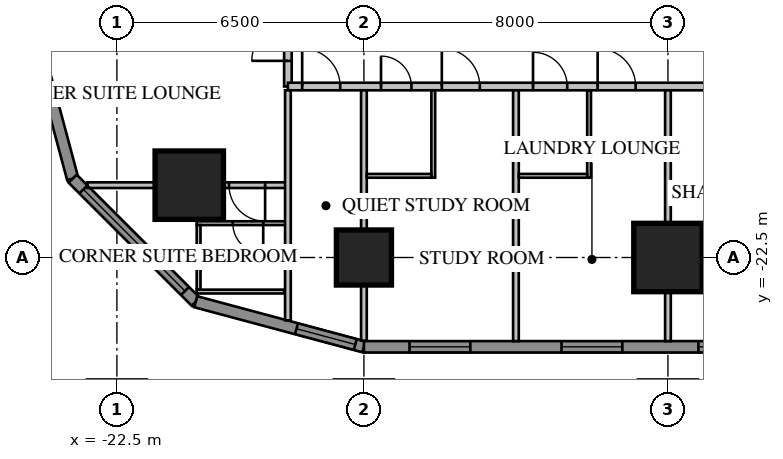
"""IFC4 building model, lengths in metres.
Left out: names, types, materials, properties, quantities, classifications, styles, units other than length and angle.
Written with IfcOpenShell. Run it as: python <this file> out.ifc"""

import sys

from ifc_helpers import new_model, si_unit, direction, frame, frame_2d, origin, origin_2d, place, context, subcontext, project, spatial, rectangle, extrude, element, fill, save


model = new_model("IFC4")
c1 = context("Model", 3, precision=1e-05, world=origin(), true_north=direction((0.0, 1.0)))
c2 = subcontext(c1, "Body", "Model", "MODEL_VIEW")
j1 = project(units=[si_unit("LENGTHUNIT", "METRE"), si_unit("PLANEANGLEUNIT", "RADIAN")], contexts=[c1])
p1 = place(None, origin())
s1 = spatial("IfcSite", under=j1, at=p1, CompositionType="ELEMENT")
p2 = place(p1, origin())
s2 = spatial("IfcBuilding", under=s1, at=p2, CompositionType="ELEMENT")
p3 = place(p2, frame((0.0, 0.0, 39.1)))
s3 = spatial("IfcBuildingStorey", under=s2, at=p3, CompositionType="ELEMENT", Elevation=39.1)
p4 = place(p3, frame((-20.596, -20.596, 0.0), z_axis=(0.0, 0.0, 1.0), x_axis=(1.0, 0.0, 0.0)))
e1 = element("IfcColumn", 1, at=p4, inside=s3, PredefinedType="COLUMN", context=c2, shape_type="SweptSolid", body=[
    extrude(rectangle(XDim=1.8, YDim=1.8, at=origin_2d()), origin(), (0.0, 0.0, 1.0), 3.85),
])
p5 = place(p3, frame((-16.0, -22.5, 0.0), z_axis=(0.0, 0.0, 1.0), x_axis=(1.0, 0.0, 0.0)))
e2 = element("IfcColumn", 2, at=p5, inside=s3, PredefinedType="COLUMN", context=c2, shape_type="SweptSolid", body=[
    extrude(rectangle(XDim=1.45, YDim=1.45, at=origin_2d()), origin(), (0.0, 0.0, 1.0), 3.85),
])
p6 = place(p3, frame((-8.0, -22.5, 0.0), z_axis=(0.0, 0.0, 1.0), x_axis=(1.0, 0.0, 0.0)))
e3 = element("IfcColumn", 3, at=p6, inside=s3, PredefinedType="COLUMN", context=c2, shape_type="SweptSolid", body=[
    extrude(rectangle(XDim=1.8, YDim=1.8, at=origin_2d()), origin(), (0.0, 0.0, 1.0), 3.85),
])
p7 = place(p3, frame((-24.85, -16.0, 0.0), z_axis=(0.0, 0.0, 1.0), x_axis=(0.258839972501, -0.965920218567, 0.0)))
e4 = element("IfcWall", 4, at=p7, inside=s3, PredefinedType="SOLIDWALL", context=c2, shape_type="SweptSolid", body=[
    extrude(rectangle(XDim=4.581, YDim=0.3, at=frame_2d((2.291, 0.0))), origin(), (0.0, 0.0, 1.0), 3.65),
])
p8 = place(p3, frame((-23.664, -20.425, 0.0), z_axis=(0.0, 0.0, 1.0), x_axis=(0.707106781187, -0.707106781187, 0.0)))
e5 = element("IfcWall", 5, at=p8, inside=s3, PredefinedType="SOLIDWALL", context=c2, shape_type="SweptSolid", body=[
    extrude(rectangle(XDim=4.581, YDim=0.3, at=frame_2d((2.291, 0.0))), origin(), (0.0, 0.0, 1.0), 3.65),
])
p9 = place(p8, frame((0.4, 0.0, 0.75)))
e6 = element("IfcOpeningElement", 6, at=p9, cuts=e5, PredefinedType="OPENING", context=c2, shape_type="SweptSolid", body=[
    extrude(rectangle(XDim=3.781, YDim=1.8, at=frame_2d((1.891, 0.9))), frame((0.0, 0.17, 0.0), z_axis=(0.0, -1.0, 0.0), x_axis=(1.0, 0.0, 0.0)), (0.0, 0.0, 1.0), 0.34),
])
p10 = place(p3, frame((-20.425, -23.664, 0.0), z_axis=(0.0, 0.0, 1.0), x_axis=(0.965920218567, -0.258839972501, 0.0)))
e7 = element("IfcWall", 7, at=p10, inside=s3, PredefinedType="SOLIDWALL", context=c2, shape_type="SweptSolid", body=[
    extrude(rectangle(XDim=4.581, YDim=0.3, at=frame_2d((2.291, 0.0))), origin(), (0.0, 0.0, 1.0), 3.65),
])
p11 = place(p10, frame((2.746, 0.0, 0.75)))
e8 = element("IfcOpeningElement", 8, at=p11, cuts=e7, PredefinedType="OPENING", context=c2, shape_type="SweptSolid", body=[
    extrude(rectangle(XDim=1.6, YDim=1.8, at=frame_2d((0.8, 0.9))), frame((0.0, 0.17, 0.0), z_axis=(0.0, -1.0, 0.0), x_axis=(1.0, 0.0, 0.0)), (0.0, 0.0, 1.0), 0.34),
])
p12 = place(p3, frame((-16.0, -24.85, 0.0), z_axis=(0.0, 0.0, 1.0), x_axis=(1.0, 0.0, 0.0)))
e9 = element("IfcWall", 9, at=p12, inside=s3, PredefinedType="SOLIDWALL", context=c2, shape_type="SweptSolid", body=[
    extrude(rectangle(XDim=32.0, YDim=0.3, at=frame_2d((16.0, 0.0))), origin(), (0.0, 0.0, 1.0), 3.65),
])
p13 = place(p12, frame((1.2, 0.0, 0.75)))
e10 = element("IfcOpeningElement", 10, at=p13, cuts=e9, PredefinedType="OPENING", context=c2, shape_type="SweptSolid", body=[
    extrude(rectangle(XDim=1.6, YDim=1.8, at=frame_2d((0.8, 0.9))), frame((0.0, 0.17, 0.0), z_axis=(0.0, -1.0, 0.0), x_axis=(1.0, 0.0, 0.0)), (0.0, 0.0, 1.0), 0.34),
])
p14 = place(p12, frame((5.2, 0.0, 0.75)))
e11 = element("IfcOpeningElement", 11, at=p14, cuts=e9, PredefinedType="OPENING", context=c2, shape_type="SweptSolid", body=[
    extrude(rectangle(XDim=1.6, YDim=1.8, at=frame_2d((0.8, 0.9))), frame((0.0, 0.17, 0.0), z_axis=(0.0, -1.0, 0.0), x_axis=(1.0, 0.0, 0.0)), (0.0, 0.0, 1.0), 0.34),
])
p15 = place(p12, frame((17.2, 0.0, 0.75)))
e12 = element("IfcOpeningElement", 12, at=p15, cuts=e9, PredefinedType="OPENING", context=c2, shape_type="SweptSolid", body=[
    extrude(rectangle(XDim=1.6, YDim=1.8, at=frame_2d((0.8, 0.9))), frame((0.0, 0.17, 0.0), z_axis=(0.0, -1.0, 0.0), x_axis=(1.0, 0.0, 0.0)), (0.0, 0.0, 1.0), 0.34),
])
p16 = place(p12, frame((21.2, 0.0, 0.75)))
e13 = element("IfcOpeningElement", 13, at=p16, cuts=e9, PredefinedType="OPENING", context=c2, shape_type="SweptSolid", body=[
    extrude(rectangle(XDim=1.6, YDim=1.8, at=frame_2d((0.8, 0.9))), frame((0.0, 0.17, 0.0), z_axis=(0.0, -1.0, 0.0), x_axis=(1.0, 0.0, 0.0)), (0.0, 0.0, 1.0), 0.34),
])
p17 = place(p12, frame((25.2, 0.0, 0.75)))
e14 = element("IfcOpeningElement", 14, at=p17, cuts=e9, PredefinedType="OPENING", context=c2, shape_type="SweptSolid", body=[
    extrude(rectangle(XDim=1.6, YDim=1.8, at=frame_2d((0.8, 0.9))), frame((0.0, 0.17, 0.0), z_axis=(0.0, -1.0, 0.0), x_axis=(1.0, 0.0, 0.0)), (0.0, 0.0, 1.0), 0.34),
])
p18 = place(p12, frame((29.2, 0.0, 0.75)))
e15 = element("IfcOpeningElement", 15, at=p18, cuts=e9, PredefinedType="OPENING", context=c2, shape_type="SweptSolid", body=[
    extrude(rectangle(XDim=1.6, YDim=1.8, at=frame_2d((0.8, 0.9))), frame((0.0, 0.17, 0.0), z_axis=(0.0, -1.0, 0.0), x_axis=(1.0, 0.0, 0.0)), (0.0, 0.0, 1.0), 0.34),
])
p19 = place(p12, frame((8.8, 0.0, 0.75)))
e16 = element("IfcOpeningElement", 16, at=p19, cuts=e9, PredefinedType="OPENING", context=c2, shape_type="SweptSolid", body=[
    extrude(rectangle(XDim=2.4, YDim=1.8, at=frame_2d((1.2, 0.9))), frame((0.0, 0.17, 0.0), z_axis=(0.0, -1.0, 0.0), x_axis=(1.0, 0.0, 0.0)), (0.0, 0.0, 1.0), 0.34),
])
p20 = place(p12, frame((13.812, 0.0, 0.0)))
e17 = element("IfcOpeningElement", 17, at=p20, cuts=e9, PredefinedType="OPENING", context=c2, shape_type="SweptSolid", body=[
    extrude(rectangle(XDim=1.0, YDim=2.4, at=frame_2d((0.5, 1.2))), frame((0.0, 0.17, 0.0), z_axis=(0.0, -1.0, 0.0), x_axis=(1.0, 0.0, 0.0)), (0.0, 0.0, 1.0), 0.34),
])
p21 = place(p3, frame((-18.0, 18.0, 0.0), z_axis=(0.0, 0.0, 1.0), x_axis=(0.0, -1.0, 0.0)))
e18 = element("IfcWall", 18, at=p21, inside=s3, PredefinedType="PARTITIONING", context=c2, shape_type="SweptSolid", body=[
    extrude(rectangle(XDim=36.0, YDim=0.2, at=frame_2d((18.0, 0.0))), origin(), (0.0, 0.0, 1.0), 3.65),
])
p22 = place(p21, frame((10.4, 0.0, 0.0)))
e19 = element("IfcOpeningElement", 19, at=p22, cuts=e18, PredefinedType="OPENING", context=c2, shape_type="SweptSolid", body=[
    extrude(rectangle(XDim=1.0, YDim=2.1, at=frame_2d((0.5, 1.05))), frame((0.0, 0.12, 0.0), z_axis=(0.0, -1.0, 0.0), x_axis=(1.0, 0.0, 0.0)), (0.0, 0.0, 1.0), 0.24),
])
p23 = place(p21, frame((0.375, 0.0, 0.0)))
e20 = element("IfcOpeningElement", 20, at=p23, cuts=e18, PredefinedType="OPENING", context=c2, shape_type="SweptSolid", body=[
    extrude(rectangle(XDim=1.0, YDim=2.1, at=frame_2d((0.5, 1.05))), frame((0.0, 0.12, 0.0), z_axis=(0.0, -1.0, 0.0), x_axis=(1.0, 0.0, 0.0)), (0.0, 0.0, 1.0), 0.24),
])
p24 = place(p21, frame((34.375, 0.0, 0.0)))
e21 = element("IfcOpeningElement", 21, at=p24, cuts=e18, PredefinedType="OPENING", context=c2, shape_type="SweptSolid", body=[
    extrude(rectangle(XDim=0.95, YDim=2.1, at=frame_2d((0.475, 1.05))), frame((0.0, 0.12, 0.0), z_axis=(0.0, -1.0, 0.0), x_axis=(1.0, 0.0, 0.0)), (0.0, 0.0, 1.0), 0.24),
])
p25 = place(p3, frame((-18.065, -21.596, 0.0), z_axis=(0.0, 0.0, 1.0), x_axis=(-1.0, 0.0, 0.0)))
e22 = element("IfcWall", 22, at=p25, inside=s3, PredefinedType="PARTITIONING", context=c2, shape_type="SweptSolid", body=[
    extrude(rectangle(XDim=2.335, YDim=0.1, at=frame_2d((1.167, 0.0))), origin(), (0.0, 0.0, 1.0), 3.65),
])
p26 = place(p25, frame((0.585, 0.0, 0.0)))
e23 = element("IfcOpeningElement", 23, at=p26, cuts=e22, PredefinedType="OPENING", context=c2, shape_type="SweptSolid", body=[
    extrude(rectangle(XDim=0.8, YDim=2.1, at=frame_2d((0.4, 1.05))), frame((0.0, 0.07, 0.0), z_axis=(0.0, -1.0, 0.0), x_axis=(1.0, 0.0, 0.0)), (0.0, 0.0, 1.0), 0.14),
])
p27 = place(p3, frame((-20.35, -21.646, 0.0), z_axis=(0.0, 0.0, 1.0), x_axis=(0.0, -1.0, 0.0)))
e24 = element("IfcWall", 24, at=p27, inside=s3, PredefinedType="PARTITIONING", context=c2, shape_type="SweptSolid", body=[
    extrude(rectangle(XDim=1.7, YDim=0.1, at=frame_2d((0.85, 0.0))), origin(), (0.0, 0.0, 1.0), 3.65),
])
p28 = place(p3, frame((-18.1, -23.396, 0.0), z_axis=(0.0, 0.0, 1.0), x_axis=(-1.0, 0.0, 0.0)))
e25 = element("IfcWall", 25, at=p28, inside=s3, PredefinedType="PARTITIONING", context=c2, shape_type="SweptSolid", body=[
    extrude(rectangle(XDim=2.3, YDim=0.1, at=frame_2d((1.15, 0.0))), origin(), (0.0, 0.0, 1.0), 3.65),
])
p29 = place(p3, frame((-18.065, -20.596, 0.0), z_axis=(0.0, 0.0, 1.0), x_axis=(-1.0, 0.0, 0.0)))
e26 = element("IfcWall", 26, at=p29, inside=s3, PredefinedType="PARTITIONING", context=c2, shape_type="SweptSolid", body=[
    extrude(rectangle(XDim=5.209, YDim=0.15, at=frame_2d((2.604, 0.0))), origin(), (0.0, 0.0, 1.0), 3.65),
])
p30 = place(p29, frame((0.535, 0.0, 0.0)))
e27 = element("IfcOpeningElement", 27, at=p30, cuts=e26, PredefinedType="OPENING", context=c2, shape_type="SweptSolid", body=[
    extrude(rectangle(XDim=0.95, YDim=2.1, at=frame_2d((0.475, 1.05))), frame((0.0, 0.095, 0.0), z_axis=(0.0, -1.0, 0.0), x_axis=(1.0, 0.0, 0.0)), (0.0, 0.0, 1.0), 0.19),
])
p31 = place(p3, frame((-18.0, -18.0, 0.0), z_axis=(0.0, 0.0, 1.0), x_axis=(1.0, 0.0, 0.0)))
e28 = element("IfcWall", 28, at=p31, inside=s3, PredefinedType="PARTITIONING", context=c2, shape_type="SweptSolid", body=[
    extrude(rectangle(XDim=36.0, YDim=0.2, at=frame_2d((18.0, 0.0))), origin(), (0.0, 0.0, 1.0), 3.65),
])
p32 = place(p31, frame((0.375, 0.0, 0.0)))
e29 = element("IfcOpeningElement", 29, at=p32, cuts=e28, PredefinedType="OPENING", context=c2, shape_type="SweptSolid", body=[
    extrude(rectangle(XDim=1.0, YDim=2.1, at=frame_2d((0.5, 1.05))), frame((0.0, 0.12, 0.0), z_axis=(0.0, -1.0, 0.0), x_axis=(1.0, 0.0, 0.0)), (0.0, 0.0, 1.0), 0.24),
])
p33 = place(p31, frame((2.45, 0.0, 0.0)))
e30 = element("IfcOpeningElement", 30, at=p33, cuts=e28, PredefinedType="OPENING", context=c2, shape_type="SweptSolid", body=[
    extrude(rectangle(XDim=0.8, YDim=2.1, at=frame_2d((0.4, 1.05))), frame((0.0, 0.12, 0.0), z_axis=(0.0, -1.0, 0.0), x_axis=(1.0, 0.0, 0.0)), (0.0, 0.0, 1.0), 0.24),
])
p34 = place(p31, frame((4.05, 0.0, 0.0)))
e31 = element("IfcOpeningElement", 31, at=p34, cuts=e28, PredefinedType="OPENING", context=c2, shape_type="SweptSolid", body=[
    extrude(rectangle(XDim=1.0, YDim=2.1, at=frame_2d((0.5, 1.05))), frame((0.0, 0.12, 0.0), z_axis=(0.0, -1.0, 0.0), x_axis=(1.0, 0.0, 0.0)), (0.0, 0.0, 1.0), 0.24),
])
p35 = place(p31, frame((6.45, 0.0, 0.0)))
e32 = element("IfcOpeningElement", 32, at=p35, cuts=e28, PredefinedType="OPENING", context=c2, shape_type="SweptSolid", body=[
    extrude(rectangle(XDim=0.9, YDim=2.1, at=frame_2d((0.45, 1.05))), frame((0.0, 0.12, 0.0), z_axis=(0.0, -1.0, 0.0), x_axis=(1.0, 0.0, 0.0)), (0.0, 0.0, 1.0), 0.24),
])
p36 = place(p31, frame((8.15, 0.0, 0.0)))
e33 = element("IfcOpeningElement", 33, at=p36, cuts=e28, PredefinedType="OPENING", context=c2, shape_type="SweptSolid", body=[
    extrude(rectangle(XDim=1.0, YDim=2.1, at=frame_2d((0.5, 1.05))), frame((0.0, 0.12, 0.0), z_axis=(0.0, -1.0, 0.0), x_axis=(1.0, 0.0, 0.0)), (0.0, 0.0, 1.0), 0.24),
])
p37 = place(p31, frame((18.375, 0.0, 0.0)))
e34 = element("IfcOpeningElement", 34, at=p37, cuts=e28, PredefinedType="OPENING", context=c2, shape_type="SweptSolid", body=[
    extrude(rectangle(XDim=0.95, YDim=2.1, at=frame_2d((0.475, 1.05))), frame((0.0, 0.12, 0.0), z_axis=(0.0, -1.0, 0.0), x_axis=(1.0, 0.0, 0.0)), (0.0, 0.0, 1.0), 0.24),
])
p38 = place(p31, frame((24.25, 0.0, 0.0)))
e35 = element("IfcOpeningElement", 35, at=p38, cuts=e28, PredefinedType="OPENING", context=c2, shape_type="SweptSolid", body=[
    extrude(rectangle(XDim=0.95, YDim=2.1, at=frame_2d((0.475, 1.05))), frame((0.0, 0.12, 0.0), z_axis=(0.0, -1.0, 0.0), x_axis=(1.0, 0.0, 0.0)), (0.0, 0.0, 1.0), 0.24),
])
p39 = place(p31, frame((26.375, 0.0, 0.0)))
e36 = element("IfcOpeningElement", 36, at=p39, cuts=e28, PredefinedType="OPENING", context=c2, shape_type="SweptSolid", body=[
    extrude(rectangle(XDim=0.95, YDim=2.1, at=frame_2d((0.475, 1.05))), frame((0.0, 0.12, 0.0), z_axis=(0.0, -1.0, 0.0), x_axis=(1.0, 0.0, 0.0)), (0.0, 0.0, 1.0), 0.24),
])
p40 = place(p31, frame((32.25, 0.0, 0.0)))
e37 = element("IfcOpeningElement", 37, at=p40, cuts=e28, PredefinedType="OPENING", context=c2, shape_type="SweptSolid", body=[
    extrude(rectangle(XDim=0.95, YDim=2.1, at=frame_2d((0.475, 1.05))), frame((0.0, 0.12, 0.0), z_axis=(0.0, -1.0, 0.0), x_axis=(1.0, 0.0, 0.0)), (0.0, 0.0, 1.0), 0.24),
])
p41 = place(p31, frame((34.375, 0.0, 0.0)))
e38 = element("IfcOpeningElement", 38, at=p41, cuts=e28, PredefinedType="OPENING", context=c2, shape_type="SweptSolid", body=[
    extrude(rectangle(XDim=0.95, YDim=2.1, at=frame_2d((0.475, 1.05))), frame((0.0, 0.12, 0.0), z_axis=(0.0, -1.0, 0.0), x_axis=(1.0, 0.0, 0.0)), (0.0, 0.0, 1.0), 0.24),
])
p42 = place(p31, frame((11.2, 0.0, 0.0)))
e39 = element("IfcOpeningElement", 39, at=p42, cuts=e28, PredefinedType="OPENING", context=c2, shape_type="SweptSolid", body=[
    extrude(rectangle(XDim=1.0, YDim=2.1, at=frame_2d((0.5, 1.05))), frame((0.0, 0.12, 0.0), z_axis=(0.0, -1.0, 0.0), x_axis=(1.0, 0.0, 0.0)), (0.0, 0.0, 1.0), 0.24),
])
p43 = place(p3, frame((-18.0, -18.1, 0.0), z_axis=(0.0, 0.0, 1.0), x_axis=(0.0, -1.0, 0.0)))
e40 = element("IfcWall", 40, at=p43, inside=s3, PredefinedType="PARTITIONING", context=c2, shape_type="SweptSolid", body=[
    extrude(rectangle(XDim=6.053, YDim=0.15, at=frame_2d((3.027, 0.0))), origin(), (0.0, 0.0, 1.0), 3.65),
])
p44 = place(p3, frame((-16.0, -18.1, 0.0), z_axis=(0.0, 0.0, 1.0), x_axis=(0.0, -1.0, 0.0)))
e41 = element("IfcWall", 41, at=p44, inside=s3, PredefinedType="PARTITIONING", context=c2, shape_type="SweptSolid", body=[
    extrude(rectangle(XDim=6.589, YDim=0.15, at=frame_2d((3.295, 0.0))), origin(), (0.0, 0.0, 1.0), 3.65),
])
for number, where, z_axis, x_axis in (
    (42, (-12.0, -18.1, 0.0), (0.0, 0.0, 1.0), (0.0, -1.0, 0.0)),
    (43, (-8.0, -18.1, 0.0), (0.0, 0.0, 1.0), (0.0, -1.0, 0.0)),
):
    element("IfcWall", number, at=place(p3, frame(where, z_axis=z_axis, x_axis=x_axis)), inside=s3, PredefinedType="PARTITIONING", context=c2, shape_type="SweptSolid", body=[
        extrude(rectangle(XDim=6.6, YDim=0.15, at=frame_2d((3.3, 0.0))), origin(), (0.0, 0.0, 1.0), 3.65),
    ])
p45 = place(p3, frame((-14.175, -18.1, 0.0), z_axis=(0.0, 0.0, 1.0), x_axis=(0.0, -1.0, 0.0)))
e44 = element("IfcWall", 44, at=p45, inside=s3, PredefinedType="PARTITIONING", context=c2, shape_type="SweptSolid", body=[
    extrude(rectangle(XDim=2.3, YDim=0.1, at=frame_2d((1.15, 0.0))), origin(), (0.0, 0.0, 1.0), 3.65),
])
p46 = place(p3, frame((-15.925, -20.35, 0.0), z_axis=(0.0, 0.0, 1.0), x_axis=(1.0, 0.0, 0.0)))
e45 = element("IfcWall", 45, at=p46, inside=s3, PredefinedType="PARTITIONING", context=c2, shape_type="SweptSolid", body=[
    extrude(rectangle(XDim=1.7, YDim=0.1, at=frame_2d((0.85, 0.0))), origin(), (0.0, 0.0, 1.0), 3.65),
])
p47 = place(p3, frame((-10.075, -18.1, 0.0), z_axis=(0.0, 0.0, 1.0), x_axis=(0.0, -1.0, 0.0)))
e46 = element("IfcWall", 46, at=p47, inside=s3, PredefinedType="PARTITIONING", context=c2, shape_type="SweptSolid", body=[
    extrude(rectangle(XDim=2.3, YDim=0.1, at=frame_2d((1.15, 0.0))), origin(), (0.0, 0.0, 1.0), 3.65),
])
p48 = place(p3, frame((-11.925, -20.35, 0.0), z_axis=(0.0, 0.0, 1.0), x_axis=(1.0, 0.0, 0.0)))
e47 = element("IfcWall", 47, at=p48, inside=s3, PredefinedType="PARTITIONING", context=c2, shape_type="SweptSolid", body=[
    extrude(rectangle(XDim=1.8, YDim=0.1, at=frame_2d((0.9, 0.0))), origin(), (0.0, 0.0, 1.0), 3.65),
])
p49 = place(p9, origin())
e48 = element("IfcWindow", 48, at=p49, inside=s3, PartitioningType="SINGLE_PANEL", PredefinedType="WINDOW", context=c2, shape_type="SweptSolid", body=[
    extrude(rectangle(XDim=3.781, YDim=1.8, at=frame_2d((1.891, 0.9))), frame((0.0, 0.03, 0.0), z_axis=(0.0, -1.0, 0.0), x_axis=(1.0, 0.0, 0.0)), (0.0, 0.0, 1.0), 0.06),
])
fill(e6, e48)
p50 = place(p11, origin())
e49 = element("IfcWindow", 49, at=p50, inside=s3, PartitioningType="SINGLE_PANEL", PredefinedType="WINDOW", context=c2, shape_type="SweptSolid", body=[
    extrude(rectangle(XDim=1.6, YDim=1.8, at=frame_2d((0.8, 0.9))), frame((0.0, 0.03, 0.0), z_axis=(0.0, -1.0, 0.0), x_axis=(1.0, 0.0, 0.0)), (0.0, 0.0, 1.0), 0.06),
])
fill(e8, e49)
p51 = place(p13, origin())
e50 = element("IfcWindow", 50, at=p51, inside=s3, PartitioningType="SINGLE_PANEL", PredefinedType="WINDOW", context=c2, shape_type="SweptSolid", body=[
    extrude(rectangle(XDim=1.6, YDim=1.8, at=frame_2d((0.8, 0.9))), frame((0.0, 0.03, 0.0), z_axis=(0.0, -1.0, 0.0), x_axis=(1.0, 0.0, 0.0)), (0.0, 0.0, 1.0), 0.06),
])
fill(e10, e50)
p52 = place(p14, origin())
e51 = element("IfcWindow", 51, at=p52, inside=s3, PartitioningType="SINGLE_PANEL", PredefinedType="WINDOW", context=c2, shape_type="SweptSolid", body=[
    extrude(rectangle(XDim=1.6, YDim=1.8, at=frame_2d((0.8, 0.9))), frame((0.0, 0.03, 0.0), z_axis=(0.0, -1.0, 0.0), x_axis=(1.0, 0.0, 0.0)), (0.0, 0.0, 1.0), 0.06),
])
fill(e11, e51)
p53 = place(p19, origin())
e52 = element("IfcWindow", 52, at=p53, inside=s3, PartitioningType="SINGLE_PANEL", PredefinedType="WINDOW", context=c2, shape_type="SweptSolid", body=[
    extrude(rectangle(XDim=2.4, YDim=1.8, at=frame_2d((1.2, 0.9))), frame((0.0, 0.03, 0.0), z_axis=(0.0, -1.0, 0.0), x_axis=(1.0, 0.0, 0.0)), (0.0, 0.0, 1.0), 0.06),
])
fill(e16, e52)
p54 = place(p24, origin())
e53 = element("IfcDoor", 53, at=p54, inside=s3, OperationType="SINGLE_SWING_RIGHT", PredefinedType="DOOR", context=c2, shape_type="SweptSolid", body=[
    extrude(rectangle(XDim=0.95, YDim=2.1, at=frame_2d((0.475, 1.05))), frame((0.0, 0.025, 0.0), z_axis=(0.0, -1.0, 0.0), x_axis=(1.0, 0.0, 0.0)), (0.0, 0.0, 1.0), 0.05),
])
fill(e21, e53)
p55 = place(p26, origin())
e54 = element("IfcDoor", 54, at=p55, inside=s3, OperationType="SINGLE_SWING_LEFT", PredefinedType="DOOR", context=c2, shape_type="SweptSolid", body=[
    extrude(rectangle(XDim=0.8, YDim=2.1, at=frame_2d((0.4, 1.05))), frame((0.0, 0.025, 0.0), z_axis=(0.0, -1.0, 0.0), x_axis=(1.0, 0.0, 0.0)), (0.0, 0.0, 1.0), 0.05),
])
fill(e23, e54)
p56 = place(p30, origin())
e55 = element("IfcDoor", 55, at=p56, inside=s3, OperationType="SINGLE_SWING_LEFT", PredefinedType="DOOR", context=c2, shape_type="SweptSolid", body=[
    extrude(rectangle(XDim=0.95, YDim=2.1, at=frame_2d((0.475, 1.05))), frame((0.0, 0.025, 0.0), z_axis=(0.0, -1.0, 0.0), x_axis=(1.0, 0.0, 0.0)), (0.0, 0.0, 1.0), 0.05),
])
fill(e27, e55)
p57 = place(p32, origin())
e56 = element("IfcDoor", 56, at=p57, inside=s3, OperationType="SINGLE_SWING_LEFT", PredefinedType="DOOR", context=c2, shape_type="SweptSolid", body=[
    extrude(rectangle(XDim=1.0, YDim=2.1, at=frame_2d((0.5, 1.05))), frame((0.0, 0.025, 0.0), z_axis=(0.0, -1.0, 0.0), x_axis=(1.0, 0.0, 0.0)), (0.0, 0.0, 1.0), 0.05),
])
fill(e29, e56)
p58 = place(p33, origin())
e57 = element("IfcDoor", 57, at=p58, inside=s3, OperationType="SINGLE_SWING_LEFT", PredefinedType="DOOR", context=c2, shape_type="SweptSolid", body=[
    extrude(rectangle(XDim=0.8, YDim=2.1, at=frame_2d((0.4, 1.05))), frame((0.0, 0.025, 0.0), z_axis=(0.0, -1.0, 0.0), x_axis=(1.0, 0.0, 0.0)), (0.0, 0.0, 1.0), 0.05),
])
fill(e30, e57)
p59 = place(p34, origin())
e58 = element("IfcDoor", 58, at=p59, inside=s3, OperationType="SINGLE_SWING_LEFT", PredefinedType="DOOR", context=c2, shape_type="SweptSolid", body=[
    extrude(rectangle(XDim=1.0, YDim=2.1, at=frame_2d((0.5, 1.05))), frame((0.0, 0.025, 0.0), z_axis=(0.0, -1.0, 0.0), x_axis=(1.0, 0.0, 0.0)), (0.0, 0.0, 1.0), 0.05),
])
fill(e31, e58)
p60 = place(p35, origin())
e59 = element("IfcDoor", 59, at=p60, inside=s3, OperationType="SINGLE_SWING_LEFT", PredefinedType="DOOR", context=c2, shape_type="SweptSolid", body=[
    extrude(rectangle(XDim=0.9, YDim=2.1, at=frame_2d((0.45, 1.05))), frame((0.0, 0.025, 0.0), z_axis=(0.0, -1.0, 0.0), x_axis=(1.0, 0.0, 0.0)), (0.0, 0.0, 1.0), 0.05),
])
fill(e32, e59)
p61 = place(p36, origin())
e60 = element("IfcDoor", 60, at=p61, inside=s3, OperationType="SINGLE_SWING_LEFT", PredefinedType="DOOR", context=c2, shape_type="SweptSolid", body=[
    extrude(rectangle(XDim=1.0, YDim=2.1, at=frame_2d((0.5, 1.05))), frame((0.0, 0.025, 0.0), z_axis=(0.0, -1.0, 0.0), x_axis=(1.0, 0.0, 0.0)), (0.0, 0.0, 1.0), 0.05),
])
fill(e33, e60)
save(model, sys.argv[1])
